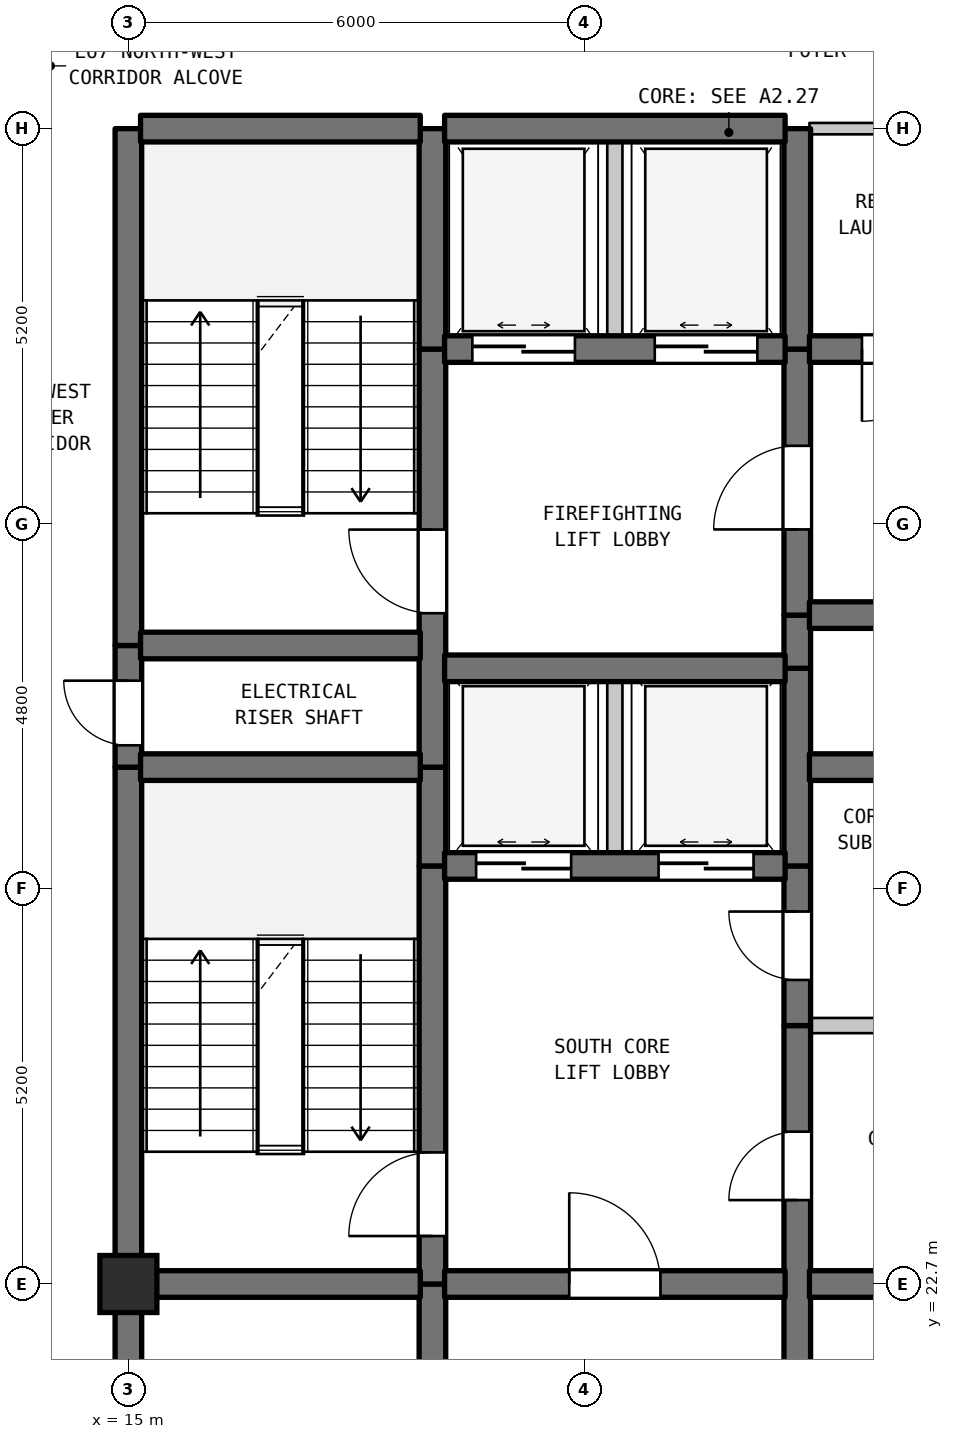
"""IFC4 building model, lengths in metres.
Left out: names, types, materials, properties, quantities, classifications, styles, units other than length and angle.
Written with IfcOpenShell. Run it as: python <this file> out.ifc"""

import sys

from ifc_helpers import new_model, si_unit, direction, frame, frame_2d, origin, origin_2d, place, context, subcontext, project, spatial, rectangle, extrude, element, fill, save


model = new_model("IFC4")
c1 = context("Model", 3, precision=1e-05, world=origin(), true_north=direction((0.0, 1.0)))
c2 = subcontext(c1, "Body", "Model", "MODEL_VIEW")
j1 = project(units=[si_unit("LENGTHUNIT", "METRE"), si_unit("PLANEANGLEUNIT", "RADIAN")], contexts=[c1])
p1 = place(None, origin())
s1 = spatial("IfcSite", under=j1, at=p1, CompositionType="ELEMENT")
p2 = place(p1, origin())
s2 = spatial("IfcBuilding", under=s1, at=p2, CompositionType="ELEMENT")
p3 = place(p2, frame((0.0, 0.0, 269.5)))
s3 = spatial("IfcBuildingStorey", under=s2, at=p3, CompositionType="ELEMENT", Elevation=269.5)
p4 = place(p3, frame((15.0, 22.7, 0.0), z_axis=(0.0, 0.0, 1.0), x_axis=(1.0, 0.0, 0.0)))
e1 = element("IfcColumn", 1, at=p4, inside=s3, PredefinedType="COLUMN", context=c2, shape_type="SweptSolid", body=[
    extrude(rectangle(XDim=0.75, YDim=0.75, at=origin_2d()), origin(), (0.0, 0.0, 1.0), 3.7),
])
p5 = place(p3, frame((15.0, 19.5, 0.0), z_axis=(0.0, 0.0, 1.0), x_axis=(0.0, 1.0, 0.0)))
e2 = element("IfcWall", 2, at=p5, inside=s3, PredefinedType="SHEAR", context=c2, shape_type="SweptSolid", body=[
    extrude(rectangle(XDim=3.2, YDim=0.35, at=frame_2d((1.6, 0.0))), origin(), (0.0, 0.0, 1.0), 3.39),
])
p6 = place(p3, frame((15.0, 22.7, 0.0), z_axis=(0.0, 0.0, 1.0), x_axis=(0.0, 1.0, 0.0)))
e3 = element("IfcWall", 3, at=p6, inside=s3, PredefinedType="SHEAR", context=c2, shape_type="SweptSolid", body=[
    extrude(rectangle(XDim=6.8, YDim=0.35, at=frame_2d((3.4, 0.0))), origin(), (0.0, 0.0, 1.0), 3.39),
])
p7 = place(p3, frame((15.0, 29.5, 0.0), z_axis=(0.0, 0.0, 1.0), x_axis=(0.0, 1.0, 0.0)))
e4 = element("IfcWall", 4, at=p7, inside=s3, PredefinedType="SHEAR", context=c2, shape_type="SweptSolid", body=[
    extrude(rectangle(XDim=1.6, YDim=0.35, at=frame_2d((0.8, 0.0))), origin(), (0.0, 0.0, 1.0), 3.39),
])
p8 = place(p7, frame((0.287, 0.0, 0.0)))
e5 = element("IfcOpeningElement", 5, at=p8, cuts=e4, PredefinedType="OPENING", context=c2, shape_type="SweptSolid", body=[
    extrude(rectangle(XDim=0.85, YDim=2.1, at=frame_2d((0.425, 1.05))), frame((0.0, 0.185, 0.0), z_axis=(0.0, -1.0, 0.0), x_axis=(1.0, 0.0, 0.0)), (0.0, 0.0, 1.0), 0.37),
])
p9 = place(p3, frame((15.0, 31.1, 0.0), z_axis=(0.0, 0.0, 1.0), x_axis=(0.0, 1.0, 0.0)))
e6 = element("IfcWall", 6, at=p9, inside=s3, PredefinedType="SHEAR", context=c2, shape_type="SweptSolid", body=[
    extrude(rectangle(XDim=6.8, YDim=0.35, at=frame_2d((3.4, 0.0))), origin(), (0.0, 0.0, 1.0), 3.39),
])
p10 = place(p3, frame((19.0, 19.5, 0.0), z_axis=(0.0, 0.0, 1.0), x_axis=(0.0, 1.0, 0.0)))
e7 = element("IfcWall", 7, at=p10, inside=s3, PredefinedType="SHEAR", context=c2, shape_type="SweptSolid", body=[
    extrude(rectangle(XDim=3.2, YDim=0.35, at=frame_2d((1.6, 0.0))), origin(), (0.0, 0.0, 1.0), 3.39),
])
p11 = place(p3, frame((19.0, 22.7, 0.0), z_axis=(0.0, 0.0, 1.0), x_axis=(0.0, 1.0, 0.0)))
e8 = element("IfcWall", 8, at=p11, inside=s3, PredefinedType="SHEAR", context=c2, shape_type="SweptSolid", body=[
    extrude(rectangle(XDim=5.5, YDim=0.35, at=frame_2d((2.75, 0.0))), origin(), (0.0, 0.0, 1.0), 3.39),
])
p12 = place(p11, frame((0.631, 0.0, 0.0)))
e9 = element("IfcOpeningElement", 9, at=p12, cuts=e8, PredefinedType="OPENING", context=c2, shape_type="SweptSolid", body=[
    extrude(rectangle(XDim=1.1, YDim=2.15, at=frame_2d((0.55, 1.075))), frame((0.0, 0.185, 0.0), z_axis=(0.0, -1.0, 0.0), x_axis=(1.0, 0.0, 0.0)), (0.0, 0.0, 1.0), 0.37),
])
p13 = place(p3, frame((19.0, 28.2, 0.0), z_axis=(0.0, 0.0, 1.0), x_axis=(0.0, 1.0, 0.0)))
e10 = element("IfcWall", 10, at=p13, inside=s3, PredefinedType="SHEAR", context=c2, shape_type="SweptSolid", body=[
    extrude(rectangle(XDim=1.3, YDim=0.35, at=frame_2d((0.65, 0.0))), origin(), (0.0, 0.0, 1.0), 3.39),
])
p14 = place(p3, frame((19.0, 29.5, 0.0), z_axis=(0.0, 0.0, 1.0), x_axis=(0.0, 1.0, 0.0)))
e11 = element("IfcWall", 11, at=p14, inside=s3, PredefinedType="SHEAR", context=c2, shape_type="SweptSolid", body=[
    extrude(rectangle(XDim=5.5, YDim=0.35, at=frame_2d((2.75, 0.0))), origin(), (0.0, 0.0, 1.0), 3.39),
])
p15 = place(p14, frame((2.025, 0.0, 0.0)))
e12 = element("IfcOpeningElement", 12, at=p15, cuts=e11, PredefinedType="OPENING", context=c2, shape_type="SweptSolid", body=[
    extrude(rectangle(XDim=1.1, YDim=2.15, at=frame_2d((0.55, 1.075))), frame((0.0, 0.185, 0.0), z_axis=(0.0, -1.0, 0.0), x_axis=(1.0, 0.0, 0.0)), (0.0, 0.0, 1.0), 0.37),
])
p16 = place(p3, frame((19.0, 35.0, 0.0), z_axis=(0.0, 0.0, 1.0), x_axis=(0.0, 1.0, 0.0)))
e13 = element("IfcWall", 13, at=p16, inside=s3, PredefinedType="SHEAR", context=c2, shape_type="SweptSolid", body=[
    extrude(rectangle(XDim=2.9, YDim=0.35, at=frame_2d((1.45, 0.0))), origin(), (0.0, 0.0, 1.0), 3.39),
])
p17 = place(p3, frame((21.4, 28.2, 0.0), z_axis=(0.0, 0.0, 1.0), x_axis=(0.0, 1.0, 0.0)))
e14 = element("IfcWall", 14, at=p17, inside=s3, PredefinedType="STANDARD", context=c2, shape_type="SweptSolid", body=[
    extrude(rectangle(XDim=2.6, YDim=0.2, at=frame_2d((1.3, 0.0))), origin(), (0.0, 0.0, 1.0), 3.39),
])
p18 = place(p3, frame((21.4, 35.0, 0.0), z_axis=(0.0, 0.0, 1.0), x_axis=(0.0, 1.0, 0.0)))
e15 = element("IfcWall", 15, at=p18, inside=s3, PredefinedType="STANDARD", context=c2, shape_type="SweptSolid", body=[
    extrude(rectangle(XDim=2.9, YDim=0.2, at=frame_2d((1.45, 0.0))), origin(), (0.0, 0.0, 1.0), 3.39),
])
p19 = place(p3, frame((23.8, 19.5, 0.0), z_axis=(0.0, 0.0, 1.0), x_axis=(0.0, 1.0, 0.0)))
e16 = element("IfcWall", 16, at=p19, inside=s3, PredefinedType="SHEAR", context=c2, shape_type="SweptSolid", body=[
    extrude(rectangle(XDim=6.6, YDim=0.35, at=frame_2d((3.3, 0.0))), origin(), (0.0, 0.0, 1.0), 3.39),
])
p20 = place(p19, frame((4.304, 0.0, 0.0)))
e17 = element("IfcOpeningElement", 17, at=p20, cuts=e16, PredefinedType="OPENING", context=c2, shape_type="SweptSolid", body=[
    extrude(rectangle(XDim=0.9, YDim=2.15, at=frame_2d((0.45, 1.075))), frame((0.0, 0.185, 0.0), z_axis=(0.0, -1.0, 0.0), x_axis=(1.0, 0.0, 0.0)), (0.0, 0.0, 1.0), 0.37),
])
p21 = place(p3, frame((23.8, 26.1, 0.0), z_axis=(0.0, 0.0, 1.0), x_axis=(0.0, 1.0, 0.0)))
e18 = element("IfcWall", 18, at=p21, inside=s3, PredefinedType="SHEAR", context=c2, shape_type="SweptSolid", body=[
    extrude(rectangle(XDim=2.1, YDim=0.35, at=frame_2d((1.05, 0.0))), origin(), (0.0, 0.0, 1.0), 3.39),
])
p22 = place(p21, frame((0.6, 0.0, 0.0)))
e19 = element("IfcOpeningElement", 19, at=p22, cuts=e18, PredefinedType="OPENING", context=c2, shape_type="SweptSolid", body=[
    extrude(rectangle(XDim=0.9, YDim=2.15, at=frame_2d((0.45, 1.075))), frame((0.0, 0.185, 0.0), z_axis=(0.0, -1.0, 0.0), x_axis=(1.0, 0.0, 0.0)), (0.0, 0.0, 1.0), 0.37),
])
p23 = place(p3, frame((23.8, 28.2, 0.0), z_axis=(0.0, 0.0, 1.0), x_axis=(0.0, 1.0, 0.0)))
e20 = element("IfcWall", 20, at=p23, inside=s3, PredefinedType="SHEAR", context=c2, shape_type="SweptSolid", body=[
    extrude(rectangle(XDim=2.6, YDim=0.35, at=frame_2d((1.3, 0.0))), origin(), (0.0, 0.0, 1.0), 3.39),
])
p24 = place(p3, frame((23.8, 30.8, 0.0), z_axis=(0.0, 0.0, 1.0), x_axis=(0.0, 1.0, 0.0)))
e21 = element("IfcWall", 21, at=p24, inside=s3, PredefinedType="SHEAR", context=c2, shape_type="SweptSolid", body=[
    extrude(rectangle(XDim=0.7, YDim=0.35, at=frame_2d((0.35, 0.0))), origin(), (0.0, 0.0, 1.0), 3.39),
])
p25 = place(p3, frame((23.8, 31.5, 0.0), z_axis=(0.0, 0.0, 1.0), x_axis=(0.0, 1.0, 0.0)))
e22 = element("IfcWall", 22, at=p25, inside=s3, PredefinedType="SHEAR", context=c2, shape_type="SweptSolid", body=[
    extrude(rectangle(XDim=3.5, YDim=0.35, at=frame_2d((1.75, 0.0))), origin(), (0.0, 0.0, 1.0), 3.39),
])
p26 = place(p25, frame((1.127, 0.0, 0.0)))
e23 = element("IfcOpeningElement", 23, at=p26, cuts=e22, PredefinedType="OPENING", context=c2, shape_type="SweptSolid", body=[
    extrude(rectangle(XDim=1.1, YDim=2.15, at=frame_2d((0.55, 1.075))), frame((0.0, 0.185, 0.0), z_axis=(0.0, -1.0, 0.0), x_axis=(1.0, 0.0, 0.0)), (0.0, 0.0, 1.0), 0.37),
])
p27 = place(p3, frame((23.8, 35.0, 0.0), z_axis=(0.0, 0.0, 1.0), x_axis=(0.0, 1.0, 0.0)))
e24 = element("IfcWall", 24, at=p27, inside=s3, PredefinedType="SHEAR", context=c2, shape_type="SweptSolid", body=[
    extrude(rectangle(XDim=2.9, YDim=0.35, at=frame_2d((1.45, 0.0))), origin(), (0.0, 0.0, 1.0), 3.39),
])
p28 = place(p3, frame((15.16, 22.7, 0.0), z_axis=(0.0, 0.0, 1.0), x_axis=(1.0, 0.0, 0.0)))
e25 = element("IfcWall", 25, at=p28, inside=s3, PredefinedType="SHEAR", context=c2, shape_type="SweptSolid", body=[
    extrude(rectangle(XDim=3.68, YDim=0.35, at=frame_2d((1.84, 0.0))), origin(), (0.0, 0.0, 1.0), 3.39),
])
p29 = place(p3, frame((19.16, 22.7, 0.0), z_axis=(0.0, 0.0, 1.0), x_axis=(1.0, 0.0, 0.0)))
e26 = element("IfcWall", 26, at=p29, inside=s3, PredefinedType="SHEAR", context=c2, shape_type="SweptSolid", body=[
    extrude(rectangle(XDim=4.48, YDim=0.35, at=frame_2d((2.24, 0.0))), origin(), (0.0, 0.0, 1.0), 3.39),
])
p30 = place(p29, frame((1.64, 0.0, 0.0)))
e27 = element("IfcOpeningElement", 27, at=p30, cuts=e26, PredefinedType="OPENING", context=c2, shape_type="SweptSolid", body=[
    extrude(rectangle(XDim=1.2, YDim=2.2, at=frame_2d((0.6, 1.1))), frame((0.0, 0.185, 0.0), z_axis=(0.0, -1.0, 0.0), x_axis=(1.0, 0.0, 0.0)), (0.0, 0.0, 1.0), 0.37),
])
p31 = place(p3, frame((23.96, 22.7, 0.0), z_axis=(0.0, 0.0, 1.0), x_axis=(1.0, 0.0, 0.0)))
e28 = element("IfcWall", 28, at=p31, inside=s3, PredefinedType="SHEAR", context=c2, shape_type="SweptSolid", body=[
    extrude(rectangle(XDim=1.855, YDim=0.35, at=frame_2d((0.927, 0.0))), origin(), (0.0, 0.0, 1.0), 3.39),
])
p32 = place(p3, frame((23.96, 26.1, 0.0), z_axis=(0.0, 0.0, 1.0), x_axis=(1.0, 0.0, 0.0)))
e29 = element("IfcWall", 29, at=p32, inside=s3, PredefinedType="STANDARD", context=c2, shape_type="SweptSolid", body=[
    extrude(rectangle(XDim=3.18, YDim=0.2, at=frame_2d((1.59, 0.0))), origin(), (0.0, 0.0, 1.0), 3.39),
])
p33 = place(p3, frame((19.16, 28.2, 0.0), z_axis=(0.0, 0.0, 1.0), x_axis=(1.0, 0.0, 0.0)))
e30 = element("IfcWall", 30, at=p33, inside=s3, PredefinedType="SHEAR", context=c2, shape_type="SweptSolid", body=[
    extrude(rectangle(XDim=4.48, YDim=0.35, at=frame_2d((2.24, 0.0))), origin(), (0.0, 0.0, 1.0), 3.39),
])
p34 = place(p33, frame((0.415, 0.0, 0.0)))
e31 = element("IfcOpeningElement", 31, at=p34, cuts=e30, PredefinedType="OPENING", context=c2, shape_type="SweptSolid", body=[
    extrude(rectangle(XDim=1.25, YDim=2.2, at=frame_2d((0.625, 1.1))), frame((0.0, 0.185, 0.0), z_axis=(0.0, -1.0, 0.0), x_axis=(1.0, 0.0, 0.0)), (0.0, 0.0, 1.0), 0.37),
])
p35 = place(p33, frame((2.815, 0.0, 0.0)))
e32 = element("IfcOpeningElement", 32, at=p35, cuts=e30, PredefinedType="OPENING", context=c2, shape_type="SweptSolid", body=[
    extrude(rectangle(XDim=1.25, YDim=2.2, at=frame_2d((0.625, 1.1))), frame((0.0, 0.185, 0.0), z_axis=(0.0, -1.0, 0.0), x_axis=(1.0, 0.0, 0.0)), (0.0, 0.0, 1.0), 0.37),
])
p36 = place(p3, frame((15.16, 29.5, 0.0), z_axis=(0.0, 0.0, 1.0), x_axis=(1.0, 0.0, 0.0)))
e33 = element("IfcWall", 33, at=p36, inside=s3, PredefinedType="SHEAR", context=c2, shape_type="SweptSolid", body=[
    extrude(rectangle(XDim=3.68, YDim=0.35, at=frame_2d((1.84, 0.0))), origin(), (0.0, 0.0, 1.0), 3.39),
])
p37 = place(p3, frame((23.96, 29.5, 0.0), z_axis=(0.0, 0.0, 1.0), x_axis=(1.0, 0.0, 0.0)))
e34 = element("IfcWall", 34, at=p37, inside=s3, PredefinedType="SHEAR", context=c2, shape_type="SweptSolid", body=[
    extrude(rectangle(XDim=3.18, YDim=0.35, at=frame_2d((1.59, 0.0))), origin(), (0.0, 0.0, 1.0), 3.39),
])
p38 = place(p3, frame((19.16, 30.8, 0.0), z_axis=(0.0, 0.0, 1.0), x_axis=(1.0, 0.0, 0.0)))
e35 = element("IfcWall", 35, at=p38, inside=s3, PredefinedType="SHEAR", context=c2, shape_type="SweptSolid", body=[
    extrude(rectangle(XDim=4.48, YDim=0.35, at=frame_2d((2.24, 0.0))), origin(), (0.0, 0.0, 1.0), 3.39),
])
p39 = place(p3, frame((15.16, 31.1, 0.0), z_axis=(0.0, 0.0, 1.0), x_axis=(1.0, 0.0, 0.0)))
e36 = element("IfcWall", 36, at=p39, inside=s3, PredefinedType="SHEAR", context=c2, shape_type="SweptSolid", body=[
    extrude(rectangle(XDim=3.68, YDim=0.35, at=frame_2d((1.84, 0.0))), origin(), (0.0, 0.0, 1.0), 3.39),
])
p40 = place(p3, frame((23.96, 31.5, 0.0), z_axis=(0.0, 0.0, 1.0), x_axis=(1.0, 0.0, 0.0)))
e37 = element("IfcWall", 37, at=p40, inside=s3, PredefinedType="SHEAR", context=c2, shape_type="SweptSolid", body=[
    extrude(rectangle(XDim=3.18, YDim=0.35, at=frame_2d((1.59, 0.0))), origin(), (0.0, 0.0, 1.0), 3.39),
])
p41 = place(p40, frame((1.094, 0.0, 0.0)))
e38 = element("IfcOpeningElement", 38, at=p41, cuts=e37, PredefinedType="OPENING", context=c2, shape_type="SweptSolid", body=[
    extrude(rectangle(XDim=0.85, YDim=2.1, at=frame_2d((0.425, 1.05))), frame((0.0, 0.185, 0.0), z_axis=(0.0, -1.0, 0.0), x_axis=(1.0, 0.0, 0.0)), (0.0, 0.0, 1.0), 0.37),
])
p42 = place(p3, frame((19.16, 35.0, 0.0), z_axis=(0.0, 0.0, 1.0), x_axis=(1.0, 0.0, 0.0)))
e39 = element("IfcWall", 39, at=p42, inside=s3, PredefinedType="SHEAR", context=c2, shape_type="SweptSolid", body=[
    extrude(rectangle(XDim=4.48, YDim=0.35, at=frame_2d((2.24, 0.0))), origin(), (0.0, 0.0, 1.0), 3.39),
])
p43 = place(p42, frame((0.365, 0.0, 0.0)))
e40 = element("IfcOpeningElement", 40, at=p43, cuts=e39, PredefinedType="OPENING", context=c2, shape_type="SweptSolid", body=[
    extrude(rectangle(XDim=1.35, YDim=2.2, at=frame_2d((0.675, 1.1))), frame((0.0, 0.185, 0.0), z_axis=(0.0, -1.0, 0.0), x_axis=(1.0, 0.0, 0.0)), (0.0, 0.0, 1.0), 0.37),
])
p44 = place(p42, frame((2.765, 0.0, 0.0)))
e41 = element("IfcOpeningElement", 41, at=p44, cuts=e39, PredefinedType="OPENING", context=c2, shape_type="SweptSolid", body=[
    extrude(rectangle(XDim=1.35, YDim=2.2, at=frame_2d((0.675, 1.1))), frame((0.0, 0.185, 0.0), z_axis=(0.0, -1.0, 0.0), x_axis=(1.0, 0.0, 0.0)), (0.0, 0.0, 1.0), 0.37),
])
p45 = place(p3, frame((23.96, 35.0, 0.0), z_axis=(0.0, 0.0, 1.0), x_axis=(1.0, 0.0, 0.0)))
e42 = element("IfcWall", 42, at=p45, inside=s3, PredefinedType="SHEAR", context=c2, shape_type="SweptSolid", body=[
    extrude(rectangle(XDim=2.595, YDim=0.35, at=frame_2d((1.297, 0.0))), origin(), (0.0, 0.0, 1.0), 3.39),
])
p46 = place(p45, frame((0.691, 0.0, 0.0)))
e43 = element("IfcOpeningElement", 43, at=p46, cuts=e42, PredefinedType="OPENING", context=c2, shape_type="SweptSolid", body=[
    extrude(rectangle(XDim=0.95, YDim=2.15, at=frame_2d((0.475, 1.075))), frame((0.0, 0.185, 0.0), z_axis=(0.0, -1.0, 0.0), x_axis=(1.0, 0.0, 0.0)), (0.0, 0.0, 1.0), 0.37),
])
p47 = place(p3, frame((15.16, 37.9, 0.0), z_axis=(0.0, 0.0, 1.0), x_axis=(1.0, 0.0, 0.0)))
e44 = element("IfcWall", 44, at=p47, inside=s3, PredefinedType="SHEAR", context=c2, shape_type="SweptSolid", body=[
    extrude(rectangle(XDim=3.68, YDim=0.35, at=frame_2d((1.84, 0.0))), origin(), (0.0, 0.0, 1.0), 3.39),
])
p48 = place(p3, frame((19.16, 37.9, 0.0), z_axis=(0.0, 0.0, 1.0), x_axis=(1.0, 0.0, 0.0)))
e45 = element("IfcWall", 45, at=p48, inside=s3, PredefinedType="SHEAR", context=c2, shape_type="SweptSolid", body=[
    extrude(rectangle(XDim=4.48, YDim=0.35, at=frame_2d((2.24, 0.0))), origin(), (0.0, 0.0, 1.0), 3.39),
])
p49 = place(p3, frame((23.96, 37.9, 0.0), z_axis=(0.0, 0.0, 1.0), x_axis=(1.0, 0.0, 0.0)))
e46 = element("IfcWall", 46, at=p49, inside=s3, PredefinedType="STANDARD", context=c2, shape_type="SweptSolid", body=[
    extrude(rectangle(XDim=2.595, YDim=0.15, at=frame_2d((1.297, 0.0))), origin(), (0.0, 0.0, 1.0), 2.89),
])
p50 = place(p8, origin())
e47 = element("IfcDoor", 47, at=p50, inside=s3, OperationType="SINGLE_SWING_RIGHT", PredefinedType="DOOR", context=c2, shape_type="SweptSolid", body=[
    extrude(rectangle(XDim=0.85, YDim=2.1, at=frame_2d((0.425, 1.05))), frame((0.0, 0.025, 0.0), z_axis=(0.0, -1.0, 0.0), x_axis=(1.0, 0.0, 0.0)), (0.0, 0.0, 1.0), 0.05),
])
fill(e5, e47)
p51 = place(p12, origin())
e48 = element("IfcDoor", 48, at=p51, inside=s3, OperationType="SINGLE_SWING_LEFT", PredefinedType="DOOR", context=c2, shape_type="SweptSolid", body=[
    extrude(rectangle(XDim=1.1, YDim=2.15, at=frame_2d((0.55, 1.075))), frame((0.0, 0.025, 0.0), z_axis=(0.0, -1.0, 0.0), x_axis=(1.0, 0.0, 0.0)), (0.0, 0.0, 1.0), 0.05),
])
fill(e9, e48)
p52 = place(p15, origin())
e49 = element("IfcDoor", 49, at=p52, inside=s3, OperationType="SINGLE_SWING_RIGHT", PredefinedType="DOOR", context=c2, shape_type="SweptSolid", body=[
    extrude(rectangle(XDim=1.1, YDim=2.15, at=frame_2d((0.55, 1.075))), frame((0.0, 0.025, 0.0), z_axis=(0.0, -1.0, 0.0), x_axis=(1.0, 0.0, 0.0)), (0.0, 0.0, 1.0), 0.05),
])
fill(e12, e49)
p53 = place(p20, origin())
e50 = element("IfcDoor", 50, at=p53, inside=s3, OperationType="SINGLE_SWING_LEFT", PredefinedType="DOOR", context=c2, shape_type="SweptSolid", body=[
    extrude(rectangle(XDim=0.9, YDim=2.15, at=frame_2d((0.45, 1.075))), frame((0.0, 0.025, 0.0), z_axis=(0.0, -1.0, 0.0), x_axis=(1.0, 0.0, 0.0)), (0.0, 0.0, 1.0), 0.05),
])
fill(e17, e50)
p54 = place(p22, origin())
e51 = element("IfcDoor", 51, at=p54, inside=s3, OperationType="SINGLE_SWING_RIGHT", PredefinedType="DOOR", context=c2, shape_type="SweptSolid", body=[
    extrude(rectangle(XDim=0.9, YDim=2.15, at=frame_2d((0.45, 1.075))), frame((0.0, 0.025, 0.0), z_axis=(0.0, -1.0, 0.0), x_axis=(1.0, 0.0, 0.0)), (0.0, 0.0, 1.0), 0.05),
])
fill(e19, e51)
p55 = place(p26, origin())
e52 = element("IfcDoor", 52, at=p55, inside=s3, OperationType="SINGLE_SWING_LEFT", PredefinedType="DOOR", context=c2, shape_type="SweptSolid", body=[
    extrude(rectangle(XDim=1.1, YDim=2.15, at=frame_2d((0.55, 1.075))), frame((0.0, 0.025, 0.0), z_axis=(0.0, -1.0, 0.0), x_axis=(1.0, 0.0, 0.0)), (0.0, 0.0, 1.0), 0.05),
])
fill(e23, e52)
p56 = place(p30, origin())
e53 = element("IfcDoor", 53, at=p56, inside=s3, OperationType="SINGLE_SWING_LEFT", PredefinedType="DOOR", context=c2, shape_type="SweptSolid", body=[
    extrude(rectangle(XDim=1.2, YDim=2.2, at=frame_2d((0.6, 1.1))), frame((0.0, 0.025, 0.0), z_axis=(0.0, -1.0, 0.0), x_axis=(1.0, 0.0, 0.0)), (0.0, 0.0, 1.0), 0.05),
])
fill(e27, e53)
p57 = place(p34, origin())
e54 = element("IfcDoor", 54, at=p57, inside=s3, OperationType="DOUBLE_DOOR_SLIDING", PredefinedType="DOOR", context=c2, shape_type="SweptSolid", body=[
    extrude(rectangle(XDim=1.25, YDim=2.2, at=frame_2d((0.625, 1.1))), frame((0.0, 0.025, 0.0), z_axis=(0.0, -1.0, 0.0), x_axis=(1.0, 0.0, 0.0)), (0.0, 0.0, 1.0), 0.05),
])
fill(e31, e54)
p58 = place(p35, origin())
e55 = element("IfcDoor", 55, at=p58, inside=s3, OperationType="DOUBLE_DOOR_SLIDING", PredefinedType="DOOR", context=c2, shape_type="SweptSolid", body=[
    extrude(rectangle(XDim=1.25, YDim=2.2, at=frame_2d((0.625, 1.1))), frame((0.0, 0.025, 0.0), z_axis=(0.0, -1.0, 0.0), x_axis=(1.0, 0.0, 0.0)), (0.0, 0.0, 1.0), 0.05),
])
fill(e32, e55)
p59 = place(p43, origin())
e56 = element("IfcDoor", 56, at=p59, inside=s3, OperationType="DOUBLE_DOOR_SLIDING", PredefinedType="DOOR", context=c2, shape_type="SweptSolid", body=[
    extrude(rectangle(XDim=1.35, YDim=2.2, at=frame_2d((0.675, 1.1))), frame((0.0, 0.025, 0.0), z_axis=(0.0, -1.0, 0.0), x_axis=(1.0, 0.0, 0.0)), (0.0, 0.0, 1.0), 0.05),
])
fill(e40, e56)
p60 = place(p44, origin())
e57 = element("IfcDoor", 57, at=p60, inside=s3, OperationType="DOUBLE_DOOR_SLIDING", PredefinedType="DOOR", context=c2, shape_type="SweptSolid", body=[
    extrude(rectangle(XDim=1.35, YDim=2.2, at=frame_2d((0.675, 1.1))), frame((0.0, 0.025, 0.0), z_axis=(0.0, -1.0, 0.0), x_axis=(1.0, 0.0, 0.0)), (0.0, 0.0, 1.0), 0.05),
])
fill(e41, e57)
p61 = place(p46, frame((0.95, 0.0, 0.0), z_axis=(0.0, 0.0, 1.0), x_axis=(-1.0, 0.0, 0.0)))
e58 = element("IfcDoor", 58, at=p61, inside=s3, OperationType="SINGLE_SWING_LEFT", PredefinedType="DOOR", context=c2, shape_type="SweptSolid", body=[
    extrude(rectangle(XDim=0.95, YDim=2.15, at=frame_2d((0.475, 1.075))), frame((0.0, 0.025, 0.0), z_axis=(0.0, -1.0, 0.0), x_axis=(1.0, 0.0, 0.0)), (0.0, 0.0, 1.0), 0.05),
])
fill(e43, e58)
save(model, sys.argv[1])
